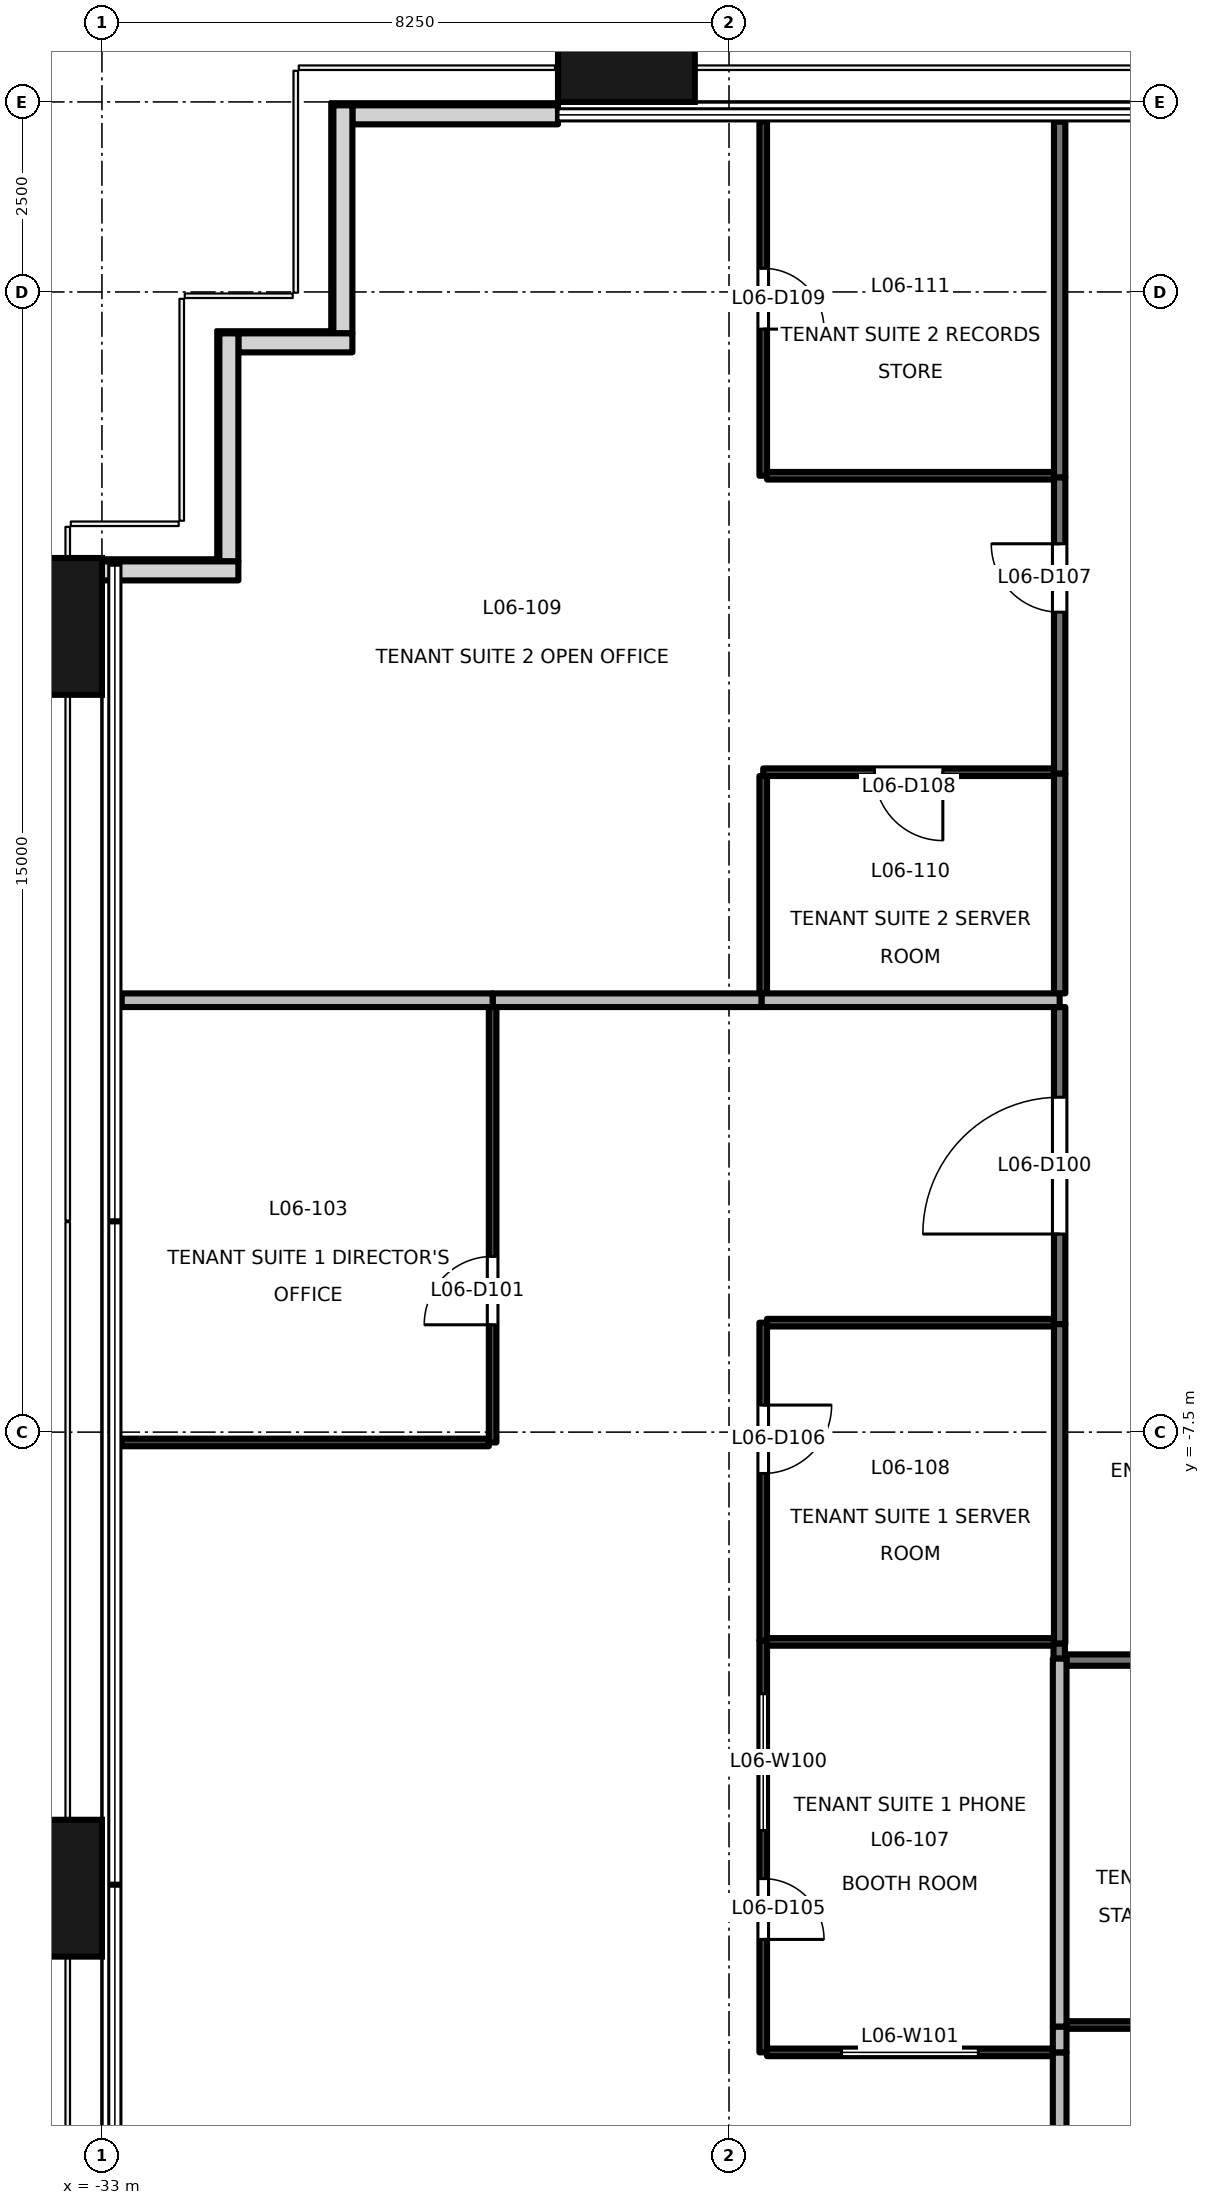
"""IFC4 building model, lengths in metres.
Left out: names, types, materials, properties, quantities, classifications, styles, units other than length and angle.
Written with IfcOpenShell. Run it as: python <this file> out.ifc"""

import sys

from ifc_helpers import new_model, si_unit, direction, frame, frame_2d, origin, origin_2d, place, context, subcontext, project, spatial, rectangle, extrude, element, fill, save


model = new_model("IFC4")
c1 = context("Model", 3, precision=1e-05, world=origin(), true_north=direction((0.0, 1.0)))
c2 = subcontext(c1, "Body", "Model", "MODEL_VIEW")
j1 = project(units=[si_unit("LENGTHUNIT", "METRE"), si_unit("PLANEANGLEUNIT", "RADIAN")], contexts=[c1])
p1 = place(None, origin())
s1 = spatial("IfcSite", under=j1, at=p1, CompositionType="ELEMENT")
p2 = place(p1, origin())
s2 = spatial("IfcBuilding", under=s1, at=p2, CompositionType="ELEMENT")
p3 = place(p2, frame((0.0, 0.0, 32.4)))
s3 = spatial("IfcBuildingStorey", under=s2, at=p3, CompositionType="ELEMENT", Elevation=32.4)
for number, where, z_axis, x_axis in (
    (1, (-33.9, -13.5, -0.2), (0.0, 0.0, 1.0), (0.0, 1.0, 0.0)),
    (2, (-33.9, 3.1, -0.2), (0.0, 0.0, 1.0), (0.0, 1.0, 0.0)),
    (3, (-26.1, 10.9, -0.2), (0.0, 0.0, 1.0), (1.0, 0.0, 0.0)),
):
    element("IfcColumn", number, at=place(p3, frame(where, z_axis=z_axis, x_axis=x_axis)), inside=s3, PredefinedType="COLUMN", context=c2, shape_type="SweptSolid", body=[
        extrude(rectangle(XDim=1.8, YDim=1.8, at=origin_2d()), origin(), (0.0, 0.0, 1.0), 4.1),
    ])
p4 = place(p3, frame((-27.0, 9.83, 0.0), z_axis=(0.0, 0.0, 1.0), x_axis=(-1.0, 0.0, 0.0)))
e4 = element("IfcWall", 4, at=p4, inside=s3, PredefinedType="SOLIDWALL", context=c2, shape_type="SweptSolid", body=[
    extrude(rectangle(XDim=2.705, YDim=0.25, at=frame_2d((1.353, 0.0))), origin(), (0.0, 0.0, 1.0), 3.9),
])
p5 = place(p3, frame((-29.83, 9.955, 0.0), z_axis=(0.0, 0.0, 1.0), x_axis=(0.0, -1.0, 0.0)))
e5 = element("IfcWall", 5, at=p5, inside=s3, PredefinedType="SOLIDWALL", context=c2, shape_type="SweptSolid", body=[
    extrude(rectangle(XDim=3.0, YDim=0.25, at=frame_2d((1.5, 0.0))), origin(), (0.0, 0.0, 1.0), 3.9),
])
p6 = place(p3, frame((-29.705, 6.83, 0.0), z_axis=(0.0, 0.0, 1.0), x_axis=(-1.0, 0.0, 0.0)))
e6 = element("IfcWall", 6, at=p6, inside=s3, PredefinedType="SOLIDWALL", context=c2, shape_type="SweptSolid", body=[
    extrude(rectangle(XDim=1.5, YDim=0.25, at=frame_2d((0.75, 0.0))), origin(), (0.0, 0.0, 1.0), 3.9),
])
p7 = place(p3, frame((-31.33, 6.955, 0.0), z_axis=(0.0, 0.0, 1.0), x_axis=(0.0, -1.0, 0.0)))
e7 = element("IfcWall", 7, at=p7, inside=s3, PredefinedType="SOLIDWALL", context=c2, shape_type="SweptSolid", body=[
    extrude(rectangle(XDim=3.0, YDim=0.25, at=frame_2d((1.5, 0.0))), origin(), (0.0, 0.0, 1.0), 3.9),
])
p8 = place(p3, frame((-31.205, 3.83, 0.0), z_axis=(0.0, 0.0, 1.0), x_axis=(-1.0, 0.0, 0.0)))
e8 = element("IfcWall", 8, at=p8, inside=s3, PredefinedType="SOLIDWALL", context=c2, shape_type="SweptSolid", body=[
    extrude(rectangle(XDim=1.8, YDim=0.25, at=frame_2d((0.9, 0.0))), origin(), (0.0, 0.0, 1.0), 3.9),
])
p9 = place(p3, frame((-20.4, -6.08, 0.0), z_axis=(0.0, 0.0, 1.0), x_axis=(0.0, 1.0, 0.0)))
e9 = element("IfcWall", 9, at=p9, inside=s3, PredefinedType="PARTITIONING", context=c2, shape_type="SweptSolid", body=[
    extrude(rectangle(XDim=4.172, YDim=0.15, at=frame_2d((2.086, 0.0))), origin(), (0.0, 0.0, 1.0), 3.3),
])
p10 = place(p9, frame((1.186, 0.0, 0.0)))
e10 = element("IfcOpeningElement", 10, at=p10, cuts=e9, PredefinedType="OPENING", context=c2, shape_type="SweptSolid", body=[
    extrude(rectangle(XDim=1.8, YDim=2.1, at=frame_2d((0.9, 1.05))), frame((0.0, 0.085, 0.0), z_axis=(0.0, -1.0, 0.0), x_axis=(1.0, 0.0, 0.0)), (0.0, 0.0, 1.0), 0.171),
])
p11 = place(p3, frame((-20.406, -10.48, 0.0), z_axis=(0.0, 0.0, 1.0), x_axis=(0.0, 1.0, 0.0)))
e11 = element("IfcWall", 11, at=p11, inside=s3, PredefinedType="PARTITIONING", context=c2, shape_type="SweptSolid", body=[
    extrude(rectangle(XDim=0.2, YDim=0.15, at=frame_2d((0.1, 0.0))), origin(), (0.0, 0.0, 1.0), 3.9),
])
p12 = place(p3, frame((-20.4, -10.28, 0.0), z_axis=(0.0, 0.0, 1.0), x_axis=(0.0, 1.0, 0.0)))
e12 = element("IfcWall", 12, at=p12, inside=s3, PredefinedType="PARTITIONING", context=c2, shape_type="SweptSolid", body=[
    extrude(rectangle(XDim=4.2, YDim=0.15, at=frame_2d((2.1, 0.0))), origin(), (0.0, 0.0, 1.0), 3.3),
])
p13 = place(p3, frame((-20.4, 1.162, 0.0), z_axis=(0.0, 0.0, 1.0), x_axis=(0.0, 1.0, 0.0)))
e13 = element("IfcWall", 13, at=p13, inside=s3, PredefinedType="PARTITIONING", context=c2, shape_type="SweptSolid", body=[
    extrude(rectangle(XDim=3.9, YDim=0.15, at=frame_2d((1.95, 0.0))), origin(), (0.0, 0.0, 1.0), 3.9),
])
p14 = place(p13, frame((2.125, 0.0, 0.0)))
e14 = element("IfcOpeningElement", 14, at=p14, cuts=e13, PredefinedType="OPENING", context=c2, shape_type="SweptSolid", body=[
    extrude(rectangle(XDim=0.9, YDim=2.1, at=frame_2d((0.45, 1.05))), frame((0.0, 0.085, 0.0), z_axis=(0.0, -1.0, 0.0), x_axis=(1.0, 0.0, 0.0)), (0.0, 0.0, 1.0), 0.171),
])
p15 = place(p3, frame((-20.4, -1.728, 0.0), z_axis=(0.0, 0.0, 1.0), x_axis=(0.0, 1.0, 0.0)))
e15 = element("IfcWall", 15, at=p15, inside=s3, PredefinedType="PARTITIONING", context=c2, shape_type="SweptSolid", body=[
    extrude(rectangle(XDim=2.89, YDim=0.15, at=frame_2d((1.445, 0.0))), origin(), (0.0, 0.0, 1.0), 3.3),
])
p16 = place(p3, frame((-20.4, 5.062, 0.0), z_axis=(0.0, 0.0, 1.0), x_axis=(0.0, 1.0, 0.0)))
e16 = element("IfcWall", 16, at=p16, inside=s3, PredefinedType="PARTITIONING", context=c2, shape_type="SweptSolid", body=[
    extrude(rectangle(XDim=4.678, YDim=0.15, at=frame_2d((2.339, 0.0))), origin(), (0.0, 0.0, 1.0), 3.9),
])
p17 = place(p3, frame((-17.42, -10.499, 0.0), z_axis=(0.0, 0.0, 1.0), x_axis=(-1.0, 0.0, 0.0)))
e17 = element("IfcWall", 17, at=p17, inside=s3, PredefinedType="PARTITIONING", context=c2, shape_type="SweptSolid", body=[
    extrude(rectangle(XDim=2.89, YDim=0.15, at=frame_2d((1.445, 0.0))), origin(), (0.0, 0.0, 1.0), 2.5),
])
p18 = place(p3, frame((-32.74, -7.636, 0.0), z_axis=(0.0, 0.0, 1.0), x_axis=(1.0, 0.0, 0.0)))
e18 = element("IfcWall", 18, at=p18, inside=s3, PredefinedType="PARTITIONING", context=c2, shape_type="SweptSolid", body=[
    extrude(rectangle(XDim=4.83, YDim=0.1, at=frame_2d((2.415, 0.0))), origin(), (0.0, 0.0, 1.0), 3.9),
])
p19 = place(p3, frame((-27.86, -7.636, 0.0), z_axis=(0.0, 0.0, 1.0), x_axis=(0.0, 1.0, 0.0)))
e19 = element("IfcWall", 19, at=p19, inside=s3, PredefinedType="PARTITIONING", context=c2, shape_type="SweptSolid", body=[
    extrude(rectangle(XDim=5.728, YDim=0.1, at=frame_2d((2.864, 0.0))), origin(), (0.0, 0.0, 1.0), 3.3),
])
p20 = place(p19, frame((1.548, 0.0, 0.0)))
e20 = element("IfcOpeningElement", 20, at=p20, cuts=e19, PredefinedType="OPENING", context=c2, shape_type="SweptSolid", body=[
    extrude(rectangle(XDim=0.9, YDim=2.1, at=frame_2d((0.45, 1.05))), frame((0.0, 0.061, 0.0), z_axis=(0.0, -1.0, 0.0), x_axis=(1.0, 0.0, 0.0)), (0.0, 0.0, 1.0), 0.121),
])
p21 = place(p3, frame((-24.3, -10.24, 0.0), z_axis=(0.0, 0.0, 1.0), x_axis=(0.0, -1.0, 0.0)))
e21 = element("IfcWall", 21, at=p21, inside=s3, PredefinedType="PARTITIONING", context=c2, shape_type="SweptSolid", body=[
    extrude(rectangle(XDim=5.42, YDim=0.1, at=frame_2d((2.71, 0.0))), origin(), (0.0, 0.0, 1.0), 3.3),
])
p22 = place(p21, frame((3.134, 0.0, 0.0)))
e22 = element("IfcOpeningElement", 22, at=p22, cuts=e21, PredefinedType="OPENING", context=c2, shape_type="SweptSolid", body=[
    extrude(rectangle(XDim=0.8, YDim=2.1, at=frame_2d((0.4, 1.05))), frame((0.0, 0.061, 0.0), z_axis=(0.0, -1.0, 0.0), x_axis=(1.0, 0.0, 0.0)), (0.0, 0.0, 1.0), 0.121),
])
p23 = place(p21, frame((0.702, 0.0, 0.9)))
e23 = element("IfcOpeningElement", 23, at=p23, cuts=e21, PredefinedType="OPENING", context=c2, shape_type="SweptSolid", body=[
    extrude(rectangle(XDim=1.8, YDim=1.2, at=frame_2d((0.9, 0.6))), frame((0.0, 0.061, 0.0), z_axis=(0.0, -1.0, 0.0), x_axis=(1.0, 0.0, 0.0)), (0.0, 0.0, 1.0), 0.121),
])
p24 = place(p3, frame((-24.25, -15.66, 0.0), z_axis=(0.0, 0.0, 1.0), x_axis=(1.0, 0.0, 0.0)))
e24 = element("IfcWall", 24, at=p24, inside=s3, PredefinedType="PARTITIONING", context=c2, shape_type="SweptSolid", body=[
    extrude(rectangle(XDim=3.76, YDim=0.1, at=frame_2d((1.88, 0.0))), origin(), (0.0, 0.0, 1.0), 3.9),
])
p25 = place(p24, frame((0.98, 0.0, 0.9)))
e25 = element("IfcOpeningElement", 25, at=p25, cuts=e24, PredefinedType="OPENING", context=c2, shape_type="SweptSolid", body=[
    extrude(rectangle(XDim=1.8, YDim=1.2, at=frame_2d((0.9, 0.6))), frame((0.0, 0.061, 0.0), z_axis=(0.0, -1.0, 0.0), x_axis=(1.0, 0.0, 0.0)), (0.0, 0.0, 1.0), 0.121),
])
p26 = place(p3, frame((-24.3, -6.06, 0.0), z_axis=(0.0, 0.0, 1.0), x_axis=(0.0, -1.0, 0.0)))
e26 = element("IfcWall", 26, at=p26, inside=s3, PredefinedType="PARTITIONING", context=c2, shape_type="SweptSolid", body=[
    extrude(rectangle(XDim=4.18, YDim=0.1, at=frame_2d((2.09, 0.0))), origin(), (0.0, 0.0, 1.0), 3.3),
])
p27 = place(p26, frame((1.084, 0.0, 0.0)))
e27 = element("IfcOpeningElement", 27, at=p27, cuts=e26, PredefinedType="OPENING", context=c2, shape_type="SweptSolid", body=[
    extrude(rectangle(XDim=0.9, YDim=2.1, at=frame_2d((0.45, 1.05))), frame((0.0, 0.061, 0.0), z_axis=(0.0, -1.0, 0.0), x_axis=(1.0, 0.0, 0.0)), (0.0, 0.0, 1.0), 0.121),
])
p28 = place(p3, frame((-20.475, -6.06, 0.0), z_axis=(0.0, 0.0, 1.0), x_axis=(-1.0, 0.0, 0.0)))
e28 = element("IfcWall", 28, at=p28, inside=s3, PredefinedType="PARTITIONING", context=c2, shape_type="SweptSolid", body=[
    extrude(rectangle(XDim=3.775, YDim=0.1, at=frame_2d((1.887, 0.0))), origin(), (0.0, 0.0, 1.0), 3.9),
])
p29 = place(p3, frame((-27.86, -1.818, 0.0), z_axis=(0.0, 0.0, 1.0), x_axis=(1.0, 0.0, 0.0)))
e29 = element("IfcWall", 29, at=p29, inside=s3, PredefinedType="PARTITIONING", context=c2, shape_type="SweptSolid", body=[
    extrude(rectangle(XDim=3.54, YDim=0.18, at=frame_2d((1.77, 0.0))), origin(), (0.0, 0.0, 1.0), 3.9),
])
p30 = place(p3, frame((-24.32, -1.818, 0.0), z_axis=(0.0, 0.0, 1.0), x_axis=(1.0, 0.0, 0.0)))
e30 = element("IfcWall", 30, at=p30, inside=s3, PredefinedType="PARTITIONING", context=c2, shape_type="SweptSolid", body=[
    extrude(rectangle(XDim=3.92, YDim=0.18, at=frame_2d((1.96, 0.0))), origin(), (0.0, 0.0, 1.0), 3.9),
])
p31 = place(p3, frame((-20.4, -15.66, 0.0), z_axis=(0.0, 0.0, 1.0), x_axis=(0.0, -1.0, 0.0)))
e31 = element("IfcWall", 31, at=p31, inside=s3, PredefinedType="PARTITIONING", context=c2, shape_type="SweptSolid", body=[
    extrude(rectangle(XDim=6.0, YDim=0.18, at=frame_2d((3.0, 0.0))), origin(), (0.0, 0.0, 1.0), 3.3),
])
p32 = place(p3, frame((-32.74, -1.818, 0.0), z_axis=(0.0, 0.0, 1.0), x_axis=(1.0, 0.0, 0.0)))
e32 = element("IfcWall", 32, at=p32, inside=s3, PredefinedType="PARTITIONING", context=c2, shape_type="SweptSolid", body=[
    extrude(rectangle(XDim=4.88, YDim=0.18, at=frame_2d((2.44, 0.0))), origin(), (0.0, 0.0, 1.0), 3.9),
])
p33 = place(p3, frame((-24.25, -10.26, 0.0), z_axis=(0.0, 0.0, 1.0), x_axis=(1.0, 0.0, 0.0)))
e33 = element("IfcWall", 33, at=p33, inside=s3, PredefinedType="PARTITIONING", context=c2, shape_type="SweptSolid", body=[
    extrude(rectangle(XDim=3.775, YDim=0.1, at=frame_2d((1.887, 0.0))), origin(), (0.0, 0.0, 1.0), 3.9),
])
p34 = place(p3, frame((-20.4, -15.32, 0.0), z_axis=(0.0, 0.0, 1.0), x_axis=(0.0, -1.0, 0.0)))
e34 = element("IfcWall", 34, at=p34, inside=s3, PredefinedType="PARTITIONING", context=c2, shape_type="SweptSolid", body=[
    extrude(rectangle(XDim=0.34, YDim=0.18, at=frame_2d((0.17, 0.0))), origin(), (0.0, 0.0, 1.0), 3.9),
])
p35 = place(p3, frame((-20.4, -10.48, 0.0), z_axis=(0.0, 0.0, 1.0), x_axis=(0.0, -1.0, 0.0)))
e35 = element("IfcWall", 35, at=p35, inside=s3, PredefinedType="PARTITIONING", context=c2, shape_type="SweptSolid", body=[
    extrude(rectangle(XDim=4.84, YDim=0.18, at=frame_2d((2.42, 0.0))), origin(), (0.0, 0.0, 1.0), 3.3),
])
p36 = place(p3, frame((-24.3, 1.132, 0.0), z_axis=(0.0, 0.0, 1.0), x_axis=(0.0, -1.0, 0.0)))
e36 = element("IfcWall", 36, at=p36, inside=s3, PredefinedType="PARTITIONING", context=c2, shape_type="SweptSolid", body=[
    extrude(rectangle(XDim=2.86, YDim=0.1, at=frame_2d((1.43, 0.0))), origin(), (0.0, 0.0, 1.0), 3.3),
])
p37 = place(p3, frame((-20.475, 1.182, 0.0), z_axis=(0.0, 0.0, 1.0), x_axis=(-1.0, 0.0, 0.0)))
e37 = element("IfcWall", 37, at=p37, inside=s3, PredefinedType="PARTITIONING", context=c2, shape_type="SweptSolid", body=[
    extrude(rectangle(XDim=3.825, YDim=0.1, at=frame_2d((1.913, 0.0))), origin(), (0.0, 0.0, 1.0), 3.9),
])
p38 = place(p37, frame((1.462, 0.0, 0.0)))
e38 = element("IfcOpeningElement", 38, at=p38, cuts=e37, PredefinedType="OPENING", context=c2, shape_type="SweptSolid", body=[
    extrude(rectangle(XDim=0.9, YDim=2.1, at=frame_2d((0.45, 1.05))), frame((0.0, 0.061, 0.0), z_axis=(0.0, -1.0, 0.0), x_axis=(1.0, 0.0, 0.0)), (0.0, 0.0, 1.0), 0.121),
])
p39 = place(p3, frame((-24.3, 9.74, 0.0), z_axis=(0.0, 0.0, 1.0), x_axis=(0.0, -1.0, 0.0)))
e39 = element("IfcWall", 39, at=p39, inside=s3, PredefinedType="PARTITIONING", context=c2, shape_type="SweptSolid", body=[
    extrude(rectangle(XDim=4.658, YDim=0.1, at=frame_2d((2.329, 0.0))), origin(), (0.0, 0.0, 1.0), 3.9),
])
p40 = place(p39, frame((1.929, 0.0, 0.0)))
e40 = element("IfcOpeningElement", 40, at=p40, cuts=e39, PredefinedType="OPENING", context=c2, shape_type="SweptSolid", body=[
    extrude(rectangle(XDim=0.8, YDim=2.1, at=frame_2d((0.4, 1.05))), frame((0.0, 0.061, 0.0), z_axis=(0.0, -1.0, 0.0), x_axis=(1.0, 0.0, 0.0)), (0.0, 0.0, 1.0), 0.121),
])
p41 = place(p3, frame((-24.25, 5.082, 0.0), z_axis=(0.0, 0.0, 1.0), x_axis=(1.0, 0.0, 0.0)))
e41 = element("IfcWall", 41, at=p41, inside=s3, PredefinedType="PARTITIONING", context=c2, shape_type="SweptSolid", body=[
    extrude(rectangle(XDim=3.775, YDim=0.1, at=frame_2d((1.887, 0.0))), origin(), (0.0, 0.0, 1.0), 3.9),
])
p42 = place(p3, frame((-20.31, -15.3, 0.0), z_axis=(0.0, 0.0, 1.0), x_axis=(1.0, 0.0, 0.0)))
e42 = element("IfcWall", 42, at=p42, inside=s3, PredefinedType="PARTITIONING", context=c2, shape_type="SweptSolid", body=[
    extrude(rectangle(XDim=2.86, YDim=0.1, at=frame_2d((1.43, 0.0))), origin(), (0.0, 0.0, 1.0), 2.5),
])
p43 = place(p10, origin())
e43 = element("IfcDoor", 43, at=p43, inside=s3, OperationType="DOUBLE_DOOR_SINGLE_SWING", PredefinedType="DOOR", context=c2, shape_type="SweptSolid", body=[
    extrude(rectangle(XDim=1.8, YDim=2.1, at=frame_2d((0.9, 1.05))), frame((0.0, 0.025, 0.0), z_axis=(0.0, -1.0, 0.0), x_axis=(1.0, 0.0, 0.0)), (0.0, 0.0, 1.0), 0.05),
])
fill(e10, e43)
p44 = place(p20, origin())
e44 = element("IfcDoor", 44, at=p44, inside=s3, OperationType="SINGLE_SWING_LEFT", PredefinedType="DOOR", context=c2, shape_type="SweptSolid", body=[
    extrude(rectangle(XDim=0.9, YDim=2.1, at=frame_2d((0.45, 1.05))), frame((0.0, 0.025, 0.0), z_axis=(0.0, -1.0, 0.0), x_axis=(1.0, 0.0, 0.0)), (0.0, 0.0, 1.0), 0.05),
])
fill(e20, e44)
p45 = place(p22, origin())
e45 = element("IfcDoor", 45, at=p45, inside=s3, OperationType="SINGLE_SWING_RIGHT", PredefinedType="DOOR", context=c2, shape_type="SweptSolid", body=[
    extrude(rectangle(XDim=0.8, YDim=2.1, at=frame_2d((0.4, 1.05))), frame((0.0, 0.025, 0.0), z_axis=(0.0, -1.0, 0.0), x_axis=(1.0, 0.0, 0.0)), (0.0, 0.0, 1.0), 0.05),
])
fill(e22, e45)
p46 = place(p27, origin())
e46 = element("IfcDoor", 46, at=p46, inside=s3, OperationType="SINGLE_SWING_LEFT", PredefinedType="DOOR", context=c2, shape_type="SweptSolid", body=[
    extrude(rectangle(XDim=0.9, YDim=2.1, at=frame_2d((0.45, 1.05))), frame((0.0, 0.025, 0.0), z_axis=(0.0, -1.0, 0.0), x_axis=(1.0, 0.0, 0.0)), (0.0, 0.0, 1.0), 0.05),
])
fill(e27, e46)
p47 = place(p14, origin())
e47 = element("IfcDoor", 47, at=p47, inside=s3, OperationType="SINGLE_SWING_RIGHT", PredefinedType="DOOR", context=c2, shape_type="SweptSolid", body=[
    extrude(rectangle(XDim=0.9, YDim=2.1, at=frame_2d((0.45, 1.05))), frame((0.0, 0.025, 0.0), z_axis=(0.0, -1.0, 0.0), x_axis=(1.0, 0.0, 0.0)), (0.0, 0.0, 1.0), 0.05),
])
fill(e14, e47)
p48 = place(p38, origin())
e48 = element("IfcDoor", 48, at=p48, inside=s3, OperationType="SINGLE_SWING_LEFT", PredefinedType="DOOR", context=c2, shape_type="SweptSolid", body=[
    extrude(rectangle(XDim=0.9, YDim=2.1, at=frame_2d((0.45, 1.05))), frame((0.0, 0.025, 0.0), z_axis=(0.0, -1.0, 0.0), x_axis=(1.0, 0.0, 0.0)), (0.0, 0.0, 1.0), 0.05),
])
fill(e38, e48)
p49 = place(p40, origin())
e49 = element("IfcDoor", 49, at=p49, inside=s3, OperationType="SINGLE_SWING_RIGHT", PredefinedType="DOOR", context=c2, shape_type="SweptSolid", body=[
    extrude(rectangle(XDim=0.8, YDim=2.1, at=frame_2d((0.4, 1.05))), frame((0.0, 0.025, 0.0), z_axis=(0.0, -1.0, 0.0), x_axis=(1.0, 0.0, 0.0)), (0.0, 0.0, 1.0), 0.05),
])
fill(e40, e49)
p50 = place(p23, origin())
e50 = element("IfcWindow", 50, at=p50, inside=s3, PartitioningType="SINGLE_PANEL", PredefinedType="WINDOW", context=c2, shape_type="SweptSolid", body=[
    extrude(rectangle(XDim=1.8, YDim=1.2, at=frame_2d((0.9, 0.6))), frame((0.0, 0.03, 0.0), z_axis=(0.0, -1.0, 0.0), x_axis=(1.0, 0.0, 0.0)), (0.0, 0.0, 1.0), 0.06),
])
fill(e23, e50)
p51 = place(p25, origin())
e51 = element("IfcWindow", 51, at=p51, inside=s3, PartitioningType="SINGLE_PANEL", PredefinedType="WINDOW", context=c2, shape_type="SweptSolid", body=[
    extrude(rectangle(XDim=1.8, YDim=1.2, at=frame_2d((0.9, 0.6))), frame((0.0, 0.03, 0.0), z_axis=(0.0, -1.0, 0.0), x_axis=(1.0, 0.0, 0.0)), (0.0, 0.0, 1.0), 0.06),
])
fill(e25, e51)
save(model, sys.argv[1])
